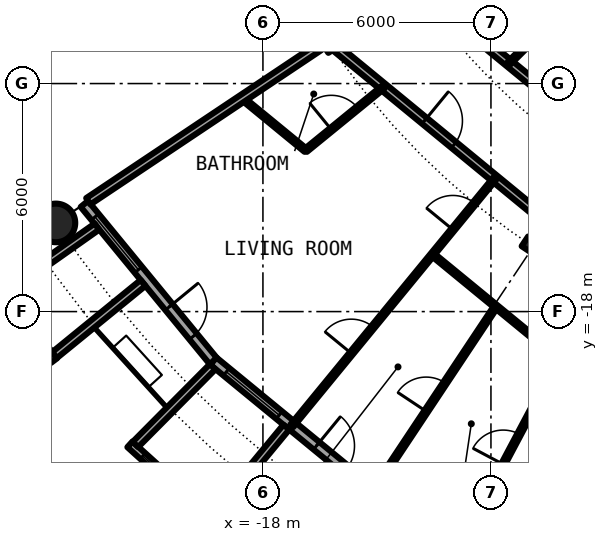
"""IFC4 building model, lengths in metres.
Left out: names, types, materials, properties, quantities, classifications, styles, units other than length and angle.
Written with IfcOpenShell. Run it as: python <this file> out.ifc"""

import sys

from ifc_helpers import new_model, si_unit, direction, frame, frame_2d, origin, origin_2d, place, context, subcontext, project, spatial, rectangle, circle, hollow_circle, i_section, extrude, element, fill, save


model = new_model("IFC4")
c1 = context("Model", 3, precision=1e-05, world=origin(), true_north=direction((0.0, 1.0)))
c2 = subcontext(c1, "Body", "Model", "MODEL_VIEW")
j1 = project(units=[si_unit("LENGTHUNIT", "METRE"), si_unit("PLANEANGLEUNIT", "RADIAN")], contexts=[c1])
p1 = place(None, origin())
s1 = spatial("IfcSite", under=j1, at=p1, CompositionType="ELEMENT")
p2 = place(p1, origin())
s2 = spatial("IfcBuilding", under=s1, at=p2, CompositionType="ELEMENT")
p3 = place(p2, frame((0.0, 0.0, 72.75)))
s3 = spatial("IfcBuildingStorey", under=s2, at=p3, CompositionType="ELEMENT", Elevation=72.75)
p4 = place(p3, frame((-23.448, -15.667, 0.0), z_axis=(0.0, 0.0, 1.0), x_axis=(1.0, 0.0, 0.0)))
e1 = element("IfcColumn", 1, at=p4, inside=s3, PredefinedType="COLUMN", context=c2, shape_type="SweptSolid", body=[
    extrude(hollow_circle(Radius=0.508, WallThickness=0.04, at=origin_2d()), origin(), (0.0, 0.0, 1.0), 3.05),
])
for number, where, z_axis, x_axis in (
    (2, (-16.297, -10.889, 0.0), (0.0, 0.0, 1.0), (-0.831, -0.556, 0.0)),
    (3, (-10.889, -16.297, 0.0), (0.0, 0.0, 1.0), (-0.556, -0.831, 0.0)),
):
    element("IfcColumn", number, at=place(p3, frame(where, z_axis=z_axis, x_axis=x_axis)), inside=s3, PredefinedType="COLUMN", context=c2, shape_type="SweptSolid", body=[
        extrude(i_section(OverallWidth=0.306, OverallDepth=0.524, WebThickness=0.021, FlangeThickness=0.04, FilletRadius=0.027, at=origin_2d()), origin(), (0.0, 0.0, 1.0), 3.05),
    ])
p5 = place(p3, frame((-22.699, -15.167, 0.0), z_axis=(0.0, 0.0, 1.0), x_axis=(0.634382322723, -0.773019449054, 0.0)))
e4 = element("IfcWall", 4, at=p5, inside=s3, PredefinedType="SOLIDWALL", context=c2, shape_type="SweptSolid", body=[
    extrude(rectangle(XDim=5.352, YDim=0.25, at=frame_2d((2.676, 0.0))), origin(), (0.0, 0.0, 1.0), 2.7),
])
p6 = place(p5, frame((0.441, 0.0, 0.3)))
e5 = element("IfcOpeningElement", 5, at=p6, cuts=e4, PredefinedType="OPENING", context=c2, shape_type="SweptSolid", body=[
    extrude(rectangle(XDim=1.8, YDim=2.1, at=frame_2d((0.9, 1.05))), frame((0.0, 0.135, 0.0), z_axis=(0.0, -1.0, 0.0), x_axis=(1.0, 0.0, 0.0)), (0.0, 0.0, 1.0), 0.27),
])
p7 = place(p5, frame((3.51, 0.0, 0.0)))
e6 = element("IfcOpeningElement", 6, at=p7, cuts=e4, PredefinedType="OPENING", context=c2, shape_type="SweptSolid", body=[
    extrude(rectangle(XDim=1.0, YDim=2.2, at=frame_2d((0.5, 1.1))), frame((0.0, 0.135, 0.0), z_axis=(0.0, -1.0, 0.0), x_axis=(1.0, 0.0, 0.0)), (0.0, 0.0, 1.0), 0.27),
])
p8 = place(p3, frame((-24.909, -17.427, -0.03), z_axis=(0.0, 0.0, 1.0), x_axis=(0.60418752353, -0.796842165306, 0.0)))
e7 = element("IfcWall", 7, at=p8, inside=s3, PredefinedType="SOLIDWALL", context=c2, shape_type="SweptSolid", body=[
    extrude(rectangle(XDim=2.337, YDim=0.2, at=frame_2d((1.168, 0.0))), origin(), (0.0, 0.0, 1.0), 2.73),
])
p9 = place(p8, frame((0.128, 0.0, 0.33)))
e8 = element("IfcOpeningElement", 8, at=p9, cuts=e7, PredefinedType="OPENING", context=c2, shape_type="SweptSolid", body=[
    extrude(circle(Radius=1.04, at=frame_2d((1.04, 1.04))), frame((0.0, 0.11, 0.0), z_axis=(0.0, -1.0, 0.0), x_axis=(1.0, 0.0, 0.0)), (0.0, 0.0, 1.0), 0.22),
])
p10 = place(p3, frame((-22.37, -15.765, -0.03), z_axis=(0.0, 0.0, 1.0), x_axis=(-0.817256123454, -0.576274612209, 0.0)))
e9 = element("IfcWall", 9, at=p10, inside=s3, PredefinedType="SOLIDWALL", context=c2, shape_type="SweptSolid", body=[
    extrude(rectangle(XDim=2.933, YDim=0.2, at=frame_2d((1.466, 0.0))), origin(), (0.0, 0.0, 1.0), 2.73),
])
p11 = place(p3, frame((-21.155, -17.246, -0.03), z_axis=(0.0, 0.0, 1.0), x_axis=(-0.775179004516, -0.631741648902, 0.0)))
e10 = element("IfcWall", 10, at=p11, inside=s3, PredefinedType="SOLIDWALL", context=c2, shape_type="SweptSolid", body=[
    extrude(rectangle(XDim=3.006, YDim=0.2, at=frame_2d((1.503, 0.0))), origin(), (0.0, 0.0, 1.0), 2.73),
])
p12 = place(p3, frame((-19.304, -19.304, 0.0), z_axis=(0.0, 0.0, 1.0), x_axis=(0.773019449054, -0.634382322723, 0.0)))
e11 = element("IfcWall", 11, at=p12, inside=s3, PredefinedType="SOLIDWALL", context=c2, shape_type="SweptSolid", body=[
    extrude(rectangle(XDim=5.352, YDim=0.25, at=frame_2d((2.676, 0.0))), origin(), (0.0, 0.0, 1.0), 2.7),
])
p13 = place(p12, frame((0.441, 0.0, 0.3)))
e12 = element("IfcOpeningElement", 12, at=p13, cuts=e11, PredefinedType="OPENING", context=c2, shape_type="SweptSolid", body=[
    extrude(rectangle(XDim=1.8, YDim=2.1, at=frame_2d((0.9, 1.05))), frame((0.0, 0.135, 0.0), z_axis=(0.0, -1.0, 0.0), x_axis=(1.0, 0.0, 0.0)), (0.0, 0.0, 1.0), 0.27),
])
p14 = place(p12, frame((3.51, 0.0, 0.0)))
e13 = element("IfcOpeningElement", 13, at=p14, cuts=e11, PredefinedType="OPENING", context=c2, shape_type="SweptSolid", body=[
    extrude(rectangle(XDim=1.0, YDim=2.2, at=frame_2d((0.5, 1.1))), frame((0.0, 0.135, 0.0), z_axis=(0.0, -1.0, 0.0), x_axis=(1.0, 0.0, 0.0)), (0.0, 0.0, 1.0), 0.27),
])
p15 = place(p3, frame((-21.5, -21.493, -0.03), z_axis=(0.0, 0.0, 1.0), x_axis=(0.740998365753, -0.671506829416, 0.0)))
e14 = element("IfcWall", 14, at=p15, inside=s3, PredefinedType="SOLIDWALL", context=c2, shape_type="SweptSolid", body=[
    extrude(rectangle(XDim=2.993, YDim=0.2, at=frame_2d((1.497, 0.0))), origin(), (0.0, 0.0, 1.0), 2.73),
])
p16 = place(p15, frame((0.457, 0.0, 0.33)))
e15 = element("IfcOpeningElement", 15, at=p16, cuts=e14, PredefinedType="OPENING", context=c2, shape_type="SweptSolid", body=[
    extrude(circle(Radius=1.04, at=frame_2d((1.04, 1.04))), frame((0.0, 0.11, 0.0), z_axis=(0.0, -1.0, 0.0), x_axis=(1.0, 0.0, 0.0)), (0.0, 0.0, 1.0), 0.22),
])
p17 = place(p3, frame((-19.323, -19.45, -0.03), z_axis=(0.0, 0.0, 1.0), x_axis=(-0.704476739375, -0.709727076896, 0.0)))
e16 = element("IfcWall", 16, at=p17, inside=s3, PredefinedType="SOLIDWALL", context=c2, shape_type="SweptSolid", body=[
    extrude(rectangle(XDim=2.883, YDim=0.2, at=frame_2d((1.441, 0.0))), origin(), (0.0, 0.0, 1.0), 2.73),
])
p18 = place(p3, frame((-17.384, -21.041, -0.03), z_axis=(0.0, 0.0, 1.0), x_axis=(-0.63709551667, -0.770784861449, 0.0)))
e17 = element("IfcWall", 17, at=p18, inside=s3, PredefinedType="SOLIDWALL", context=c2, shape_type="SweptSolid", body=[
    extrude(rectangle(XDim=3.006, YDim=0.2, at=frame_2d((1.503, 0.0))), origin(), (0.0, 0.0, 1.0), 2.73),
])
p19 = place(p3, frame((-18.542, -12.389, 0.0), z_axis=(0.0, 0.0, 1.0), x_axis=(0.772948171844, -0.634469166818, 0.0)))
e18 = element("IfcWall", 18, at=p19, inside=s3, PredefinedType="PARTITIONING", context=c2, shape_type="SweptSolid", body=[
    extrude(rectangle(XDim=2.158, YDim=0.1, at=frame_2d((1.079, 0.0))), origin(), (0.0, 0.0, 1.0), 2.7),
])
p20 = place(p3, frame((-13.538, -16.496, 0.0), z_axis=(0.0, 0.0, 1.0), x_axis=(0.773000340237, -0.634405606843, 0.0)))
e19 = element("IfcWall", 19, at=p20, inside=s3, PredefinedType="PARTITIONING", context=c2, shape_type="SweptSolid", body=[
    extrude(rectangle(XDim=6.474, YDim=0.1, at=frame_2d((3.237, 0.0))), origin(), (0.0, 0.0, 1.0), 2.7),
])
p21 = place(p3, frame((-16.172, -10.99, 0.0), z_axis=(0.0, 0.0, 1.0), x_axis=(0.772669779479, -0.634808169355, 0.0)))
e20 = element("IfcWall", 20, at=p21, inside=s3, PredefinedType="PARTITIONING", context=c2, shape_type="SweptSolid", body=[
    extrude(rectangle(XDim=11.208, YDim=0.2, at=frame_2d((5.604, 0.0))), origin(), (0.0, 0.0, 1.0), 2.38),
])
p22 = place(p21, frame((3.135, 0.0, 0.0)))
e21 = element("IfcOpeningElement", 21, at=p22, cuts=e20, PredefinedType="OPENING", context=c2, shape_type="SweptSolid", body=[
    extrude(rectangle(XDim=1.0, YDim=2.3, at=frame_2d((0.5, 1.15))), frame((0.0, 0.11, 0.0), z_axis=(0.0, -1.0, 0.0), x_axis=(1.0, 0.0, 0.0)), (0.0, 0.0, 1.0), 0.22),
])
p23 = place(p3, frame((-14.05, -9.392, 0.0), z_axis=(0.0, 0.0, 1.0), x_axis=(0.773074935257, -0.634314704605, 0.0)))
e22 = element("IfcWall", 22, at=p23, inside=s3, PredefinedType="PARTITIONING", context=c2, shape_type="SweptSolid", body=[
    extrude(rectangle(XDim=9.809, YDim=0.2, at=frame_2d((4.904, 0.0))), origin(), (0.0, 0.0, 1.0), 2.7),
])
p24 = place(p23, frame((4.402, 0.0, 0.0)))
e23 = element("IfcOpeningElement", 23, at=p24, cuts=e22, PredefinedType="OPENING", context=c2, shape_type="SweptSolid", body=[
    extrude(rectangle(XDim=1.0, YDim=2.3, at=frame_2d((0.5, 1.15))), frame((0.0, 0.11, 0.0), z_axis=(0.0, -1.0, 0.0), x_axis=(1.0, 0.0, 0.0)), (0.0, 0.0, 1.0), 0.22),
])
p25 = place(p3, frame((-22.595, -15.097, 0.0), z_axis=(0.0, 0.0, 1.0), x_axis=(0.831505405283, 0.555516661303, 0.0)))
e24 = element("IfcWall", 24, at=p25, inside=s3, PredefinedType="PARTITIONING", context=c2, shape_type="SweptSolid", body=[
    extrude(rectangle(XDim=7.312, YDim=0.2, at=frame_2d((3.656, 0.0))), origin(), (0.0, 0.0, 1.0), 2.7),
])
p26 = place(p3, frame((-17.24, -21.007, 0.0), z_axis=(0.0, 0.0, 1.0), x_axis=(0.634396151441, 0.77300810024, 0.0)))
e25 = element("IfcWall", 25, at=p26, inside=s3, PredefinedType="PARTITIONING", context=c2, shape_type="SweptSolid", body=[
    extrude(rectangle(XDim=8.419, YDim=0.1, at=frame_2d((4.209, 0.0))), origin(), (0.0, 0.0, 1.0), 2.7),
])
p27 = place(p26, frame((6.679, 0.0, 0.0)))
e26 = element("IfcOpeningElement", 26, at=p27, cuts=e25, PredefinedType="OPENING", context=c2, shape_type="SweptSolid", body=[
    extrude(rectangle(XDim=0.9, YDim=2.3, at=frame_2d((0.45, 1.15))), frame((0.0, 0.06, 0.0), z_axis=(0.0, -1.0, 0.0), x_axis=(1.0, 0.0, 0.0)), (0.0, 0.0, 1.0), 0.12),
])
p28 = place(p26, frame((2.468, 0.0, 0.0)))
e27 = element("IfcOpeningElement", 27, at=p28, cuts=e25, PredefinedType="OPENING", context=c2, shape_type="SweptSolid", body=[
    extrude(rectangle(XDim=0.9, YDim=2.3, at=frame_2d((0.45, 1.15))), frame((0.0, 0.06, 0.0), z_axis=(0.0, -1.0, 0.0), x_axis=(1.0, 0.0, 0.0)), (0.0, 0.0, 1.0), 0.12),
])
p29 = place(p3, frame((-16.874, -13.758, 0.0), z_axis=(0.0, 0.0, 1.0), x_axis=(0.774979608522, 0.631986239072, 0.0)))
e28 = element("IfcWall", 28, at=p29, inside=s3, PredefinedType="PARTITIONING", context=c2, shape_type="SweptSolid", body=[
    extrude(rectangle(XDim=2.636, YDim=0.1, at=frame_2d((1.318, 0.0))), origin(), (0.0, 0.0, 1.0), 2.7),
])
p30 = place(p29, frame((0.868, 0.0, 0.0)))
e29 = element("IfcOpeningElement", 29, at=p30, cuts=e28, PredefinedType="OPENING", context=c2, shape_type="SweptSolid", body=[
    extrude(rectangle(XDim=0.9, YDim=2.3, at=frame_2d((0.45, 1.15))), frame((0.0, 0.06, 0.0), z_axis=(0.0, -1.0, 0.0), x_axis=(1.0, 0.0, 0.0)), (0.0, 0.0, 1.0), 0.12),
])
p31 = place(p3, frame((-15.041, -22.632, 0.0), z_axis=(0.0, 0.0, 1.0), x_axis=(0.553637025191, 0.83275809473, 0.0)))
e30 = element("IfcWall", 30, at=p31, inside=s3, PredefinedType="PARTITIONING", context=c2, shape_type="SweptSolid", body=[
    extrude(rectangle(XDim=5.726, YDim=0.1, at=frame_2d((2.863, 0.0))), origin(), (0.0, 0.0, 1.0), 2.7),
])
p32 = place(p31, frame((2.412, 0.0, 0.0)))
e31 = element("IfcOpeningElement", 31, at=p32, cuts=e30, PredefinedType="OPENING", context=c2, shape_type="SweptSolid", body=[
    extrude(rectangle(XDim=0.9, YDim=2.3, at=frame_2d((0.45, 1.15))), frame((0.0, 0.06, 0.0), z_axis=(0.0, -1.0, 0.0), x_axis=(1.0, 0.0, 0.0)), (0.0, 0.0, 1.0), 0.12),
])
p33 = place(p3, frame((-12.734, -24.007, 0.0), z_axis=(0.0, 0.0, 1.0), x_axis=(0.468610030042, 0.883405139075, 0.0)))
e32 = element("IfcWall", 32, at=p33, inside=s3, PredefinedType="PARTITIONING", context=c2, shape_type="SweptSolid", body=[
    extrude(rectangle(XDim=5.403, YDim=0.1, at=frame_2d((2.702, 0.0))), origin(), (0.0, 0.0, 1.0), 2.7),
])
p34 = place(p33, frame((2.252, 0.0, 0.0)))
e33 = element("IfcOpeningElement", 33, at=p34, cuts=e32, PredefinedType="OPENING", context=c2, shape_type="SweptSolid", body=[
    extrude(rectangle(XDim=0.9, YDim=2.3, at=frame_2d((0.45, 1.15))), frame((0.0, 0.06, 0.0), z_axis=(0.0, -1.0, 0.0), x_axis=(1.0, 0.0, 0.0)), (0.0, 0.0, 1.0), 0.12),
])
p35 = place(p3, frame((-11.524, -11.464, 0.0), z_axis=(0.0, 0.0, 1.0), x_axis=(0.708796844581, 0.705412668665, 0.0)))
e34 = element("IfcWall", 34, at=p35, inside=s3, PredefinedType="PARTITIONING", context=c2, shape_type="SweptSolid", body=[
    extrude(rectangle(XDim=2.597, YDim=0.1, at=frame_2d((1.299, 0.0))), origin(), (0.0, 0.0, 1.0), 2.7),
])
p36 = place(p35, frame((0.849, 0.0, 0.0)))
e35 = element("IfcOpeningElement", 35, at=p36, cuts=e34, PredefinedType="OPENING", context=c2, shape_type="SweptSolid", body=[
    extrude(rectangle(XDim=0.9, YDim=2.3, at=frame_2d((0.45, 1.15))), frame((0.0, 0.06, 0.0), z_axis=(0.0, -1.0, 0.0), x_axis=(1.0, 0.0, 0.0)), (0.0, 0.0, 1.0), 0.12),
])
p37 = place(p6, origin())
e36 = element("IfcWindow", 36, at=p37, inside=s3, PartitioningType="SINGLE_PANEL", PredefinedType="WINDOW", context=c2, shape_type="SweptSolid", body=[
    extrude(rectangle(XDim=1.8, YDim=2.1, at=frame_2d((0.9, 1.05))), frame((0.0, 0.03, 0.0), z_axis=(0.0, -1.0, 0.0), x_axis=(1.0, 0.0, 0.0)), (0.0, 0.0, 1.0), 0.06),
])
fill(e5, e36)
p38 = place(p7, origin())
e37 = element("IfcDoor", 37, at=p38, inside=s3, OperationType="SINGLE_SWING_LEFT", PredefinedType="DOOR", context=c2, shape_type="SweptSolid", body=[
    extrude(rectangle(XDim=1.0, YDim=2.2, at=frame_2d((0.5, 1.1))), frame((0.0, 0.025, 0.0), z_axis=(0.0, -1.0, 0.0), x_axis=(1.0, 0.0, 0.0)), (0.0, 0.0, 1.0), 0.05),
])
fill(e6, e37)
p39 = place(p13, origin())
e38 = element("IfcWindow", 38, at=p39, inside=s3, PartitioningType="SINGLE_PANEL", PredefinedType="WINDOW", context=c2, shape_type="SweptSolid", body=[
    extrude(rectangle(XDim=1.8, YDim=2.1, at=frame_2d((0.9, 1.05))), frame((0.0, 0.03, 0.0), z_axis=(0.0, -1.0, 0.0), x_axis=(1.0, 0.0, 0.0)), (0.0, 0.0, 1.0), 0.06),
])
fill(e12, e38)
p40 = place(p16, origin())
e39 = element("IfcWindow", 39, at=p40, inside=s3, PartitioningType="SINGLE_PANEL", PredefinedType="WINDOW", context=c2, shape_type="SweptSolid", body=[
    extrude(circle(Radius=1.04, at=frame_2d((1.04, 1.04))), frame((0.0, 0.03, 0.0), z_axis=(0.0, -1.0, 0.0), x_axis=(1.0, 0.0, 0.0)), (0.0, 0.0, 1.0), 0.06),
])
fill(e15, e39)
p41 = place(p14, origin())
e40 = element("IfcDoor", 40, at=p41, inside=s3, OperationType="SINGLE_SWING_LEFT", PredefinedType="DOOR", context=c2, shape_type="SweptSolid", body=[
    extrude(rectangle(XDim=1.0, YDim=2.2, at=frame_2d((0.5, 1.1))), frame((0.0, 0.025, 0.0), z_axis=(0.0, -1.0, 0.0), x_axis=(1.0, 0.0, 0.0)), (0.0, 0.0, 1.0), 0.05),
])
fill(e13, e40)
p42 = place(p22, origin())
e41 = element("IfcDoor", 41, at=p42, inside=s3, OperationType="SINGLE_SWING_LEFT", PredefinedType="DOOR", context=c2, shape_type="SweptSolid", body=[
    extrude(rectangle(XDim=1.0, YDim=2.3, at=frame_2d((0.5, 1.15))), frame((0.0, 0.025, 0.0), z_axis=(0.0, -1.0, 0.0), x_axis=(1.0, 0.0, 0.0)), (0.0, 0.0, 1.0), 0.05),
])
fill(e21, e41)
p43 = place(p30, origin())
e42 = element("IfcDoor", 42, at=p43, inside=s3, OperationType="SINGLE_SWING_LEFT", PredefinedType="DOOR", context=c2, shape_type="SweptSolid", body=[
    extrude(rectangle(XDim=0.9, YDim=2.3, at=frame_2d((0.45, 1.15))), frame((0.0, 0.025, 0.0), z_axis=(0.0, -1.0, 0.0), x_axis=(1.0, 0.0, 0.0)), (0.0, 0.0, 1.0), 0.05),
])
fill(e29, e42)
p44 = place(p27, origin())
e43 = element("IfcDoor", 43, at=p44, inside=s3, OperationType="SINGLE_SWING_RIGHT", PredefinedType="DOOR", context=c2, shape_type="SweptSolid", body=[
    extrude(rectangle(XDim=0.9, YDim=2.3, at=frame_2d((0.45, 1.15))), frame((0.0, 0.025, 0.0), z_axis=(0.0, -1.0, 0.0), x_axis=(1.0, 0.0, 0.0)), (0.0, 0.0, 1.0), 0.05),
])
fill(e26, e43)
p45 = place(p28, origin())
e44 = element("IfcDoor", 44, at=p45, inside=s3, OperationType="SINGLE_SWING_LEFT", PredefinedType="DOOR", context=c2, shape_type="SweptSolid", body=[
    extrude(rectangle(XDim=0.9, YDim=2.3, at=frame_2d((0.45, 1.15))), frame((0.0, 0.025, 0.0), z_axis=(0.0, -1.0, 0.0), x_axis=(1.0, 0.0, 0.0)), (0.0, 0.0, 1.0), 0.05),
])
fill(e27, e44)
p46 = place(p32, origin())
e45 = element("IfcDoor", 45, at=p46, inside=s3, OperationType="SINGLE_SWING_LEFT", PredefinedType="DOOR", context=c2, shape_type="SweptSolid", body=[
    extrude(rectangle(XDim=0.9, YDim=2.3, at=frame_2d((0.45, 1.15))), frame((0.0, 0.025, 0.0), z_axis=(0.0, -1.0, 0.0), x_axis=(1.0, 0.0, 0.0)), (0.0, 0.0, 1.0), 0.05),
])
fill(e31, e45)
p47 = place(p34, origin())
e46 = element("IfcDoor", 46, at=p47, inside=s3, OperationType="SINGLE_SWING_LEFT", PredefinedType="DOOR", context=c2, shape_type="SweptSolid", body=[
    extrude(rectangle(XDim=0.9, YDim=2.3, at=frame_2d((0.45, 1.15))), frame((0.0, 0.025, 0.0), z_axis=(0.0, -1.0, 0.0), x_axis=(1.0, 0.0, 0.0)), (0.0, 0.0, 1.0), 0.05),
])
fill(e33, e46)
save(model, sys.argv[1])
